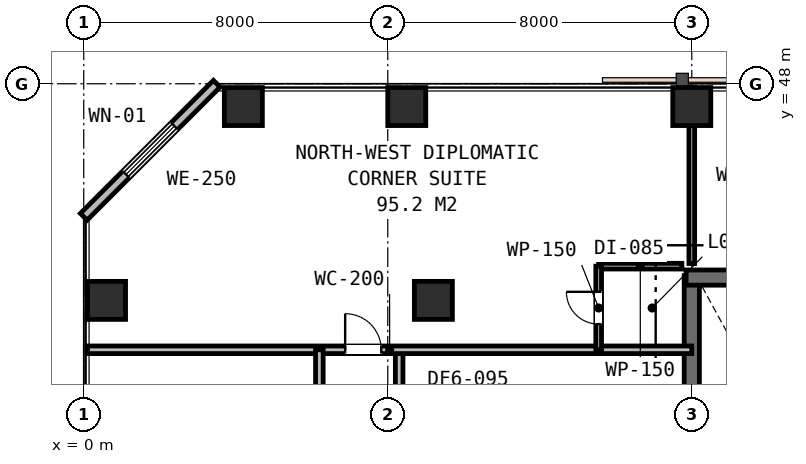
"""IFC4 building model, lengths in metres.
Left out: names, types, materials, properties, quantities, classifications, styles, units other than length and angle.
Written with IfcOpenShell. Run it as: python <this file> out.ifc"""

import sys

from ifc_helpers import new_model, si_unit, direction, frame, frame_2d, origin, origin_2d, place, context, subcontext, project, spatial, rectangle, extrude, element, fill, save


model = new_model("IFC4")
c1 = context("Model", 3, precision=1e-05, world=origin(), true_north=direction((0.0, 1.0)))
c2 = subcontext(c1, "Body", "Model", "MODEL_VIEW")
j1 = project(units=[si_unit("LENGTHUNIT", "METRE"), si_unit("PLANEANGLEUNIT", "RADIAN")], contexts=[c1])
p1 = place(None, origin())
s1 = spatial("IfcSite", under=j1, at=p1, CompositionType="ELEMENT")
p2 = place(p1, origin())
s2 = spatial("IfcBuilding", under=s1, at=p2, CompositionType="ELEMENT")
p3 = place(p2, frame((0.0, 0.0, 33.0)))
s3 = spatial("IfcBuildingStorey", under=s2, at=p3, CompositionType="ELEMENT", Elevation=33.0)
p4 = place(p3, frame((16.0, 30.65, 0.0), z_axis=(0.0, 0.0, 1.0), x_axis=(0.0, 1.0, 0.0)))
e1 = element("IfcWall", 1, at=p4, inside=s3, PredefinedType="SHEAR", context=c2, shape_type="SweptSolid", body=[
    extrude(rectangle(XDim=12.3, YDim=0.4, at=frame_2d((6.15, 0.0))), origin(), (0.0, 0.0, 1.0), 3.6),
])
p5 = place(p3, frame((15.85, 42.9, 0.0), z_axis=(0.0, 0.0, 1.0), x_axis=(1.0, 0.0, 0.0)))
e2 = element("IfcWall", 2, at=p5, inside=s3, PredefinedType="SHEAR", context=c2, shape_type="SweptSolid", body=[
    extrude(rectangle(XDim=24.3, YDim=0.4, at=frame_2d((12.15, 0.0))), origin(), (0.0, 0.0, 1.0), 3.6),
])
for number, where, z_axis, x_axis in (
    (3, (9.2, 42.3, 0.0), (0.0, 0.0, 1.0), (1.0, 0.0, 0.0)),
    (4, (0.6, 42.3, 0.0), (0.0, 0.0, 1.0), (1.0, 0.0, 0.0)),
    (5, (4.2, 47.4, 0.0), (0.0, 0.0, 1.0), (1.0, 0.0, 0.0)),
    (6, (8.5, 47.4, 0.0), (0.0, 0.0, 1.0), (1.0, 0.0, 0.0)),
    (7, (16.0, 47.4, 0.0), (0.0, 0.0, 1.0), (1.0, 0.0, 0.0)),
):
    element("IfcColumn", number, at=place(p3, frame(where, z_axis=z_axis, x_axis=x_axis)), inside=s3, PredefinedType="COLUMN", context=c2, shape_type="SweptSolid", body=[
        extrude(rectangle(XDim=1.0, YDim=1.0, at=origin_2d()), origin(), (0.0, 0.0, 1.0), 3.6),
    ])
p6 = place(p3, frame((3.5, 48.0, 0.0), z_axis=(0.0, 0.0, 1.0), x_axis=(-0.707106781187, -0.707106781187, 0.0)))
e8 = element("IfcWall", 8, at=p6, inside=s3, PredefinedType="STANDARD", context=c2, shape_type="SweptSolid", body=[
    extrude(rectangle(XDim=4.95, YDim=0.25, at=frame_2d((2.475, 0.0))), origin(), (0.0, 0.0, 1.0), 3.33),
])
p7 = place(p6, frame((1.575, 0.0, 0.75)))
e9 = element("IfcOpeningElement", 9, at=p7, cuts=e8, PredefinedType="OPENING", context=c2, shape_type="SweptSolid", body=[
    extrude(rectangle(XDim=1.8, YDim=1.85, at=frame_2d((0.9, 0.925))), frame((0.0, 0.135, 0.0), z_axis=(0.0, -1.0, 0.0), x_axis=(1.0, 0.0, 0.0)), (0.0, 0.0, 1.0), 0.27),
])
p8 = place(p3, frame((8.3, 30.8, 0.0), z_axis=(0.0, 0.0, 1.0), x_axis=(0.0, 1.0, 0.0)))
e10 = element("IfcWall", 10, at=p8, inside=s3, PredefinedType="PARTITIONING", context=c2, shape_type="SweptSolid", body=[
    extrude(rectangle(XDim=10.2, YDim=0.2, at=frame_2d((5.1, 0.0))), origin(), (0.0, 0.0, 1.0), 2.68),
])
p9 = place(p8, frame((1.95, 0.0, 0.0)))
e11 = element("IfcOpeningElement", 11, at=p9, cuts=e10, PredefinedType="OPENING", context=c2, shape_type="SweptSolid", body=[
    extrude(rectangle(XDim=0.9, YDim=2.15, at=frame_2d((0.45, 1.075))), frame((0.0, 0.11, 0.0), z_axis=(0.0, -1.0, 0.0), x_axis=(1.0, 0.0, 0.0)), (0.0, 0.0, 1.0), 0.22),
])
p10 = place(p8, frame((7.025, 0.0, 0.0)))
e12 = element("IfcOpeningElement", 12, at=p10, cuts=e10, PredefinedType="OPENING", context=c2, shape_type="SweptSolid", body=[
    extrude(rectangle(XDim=0.95, YDim=2.15, at=frame_2d((0.475, 1.075))), frame((0.0, 0.11, 0.0), z_axis=(0.0, -1.0, 0.0), x_axis=(1.0, 0.0, 0.0)), (0.0, 0.0, 1.0), 0.22),
])
p11 = place(p3, frame((0.1, 41.0, 0.0), z_axis=(0.0, 0.0, 1.0), x_axis=(1.0, 0.0, 0.0)))
e13 = element("IfcWall", 13, at=p11, inside=s3, PredefinedType="PARTITIONING", context=c2, shape_type="SweptSolid", body=[
    extrude(rectangle(XDim=15.9, YDim=0.2, at=frame_2d((7.95, 0.0))), origin(), (0.0, 0.0, 1.0), 2.68),
])
p12 = place(p11, frame((6.779, 0.0, 0.0)))
e14 = element("IfcOpeningElement", 14, at=p12, cuts=e13, PredefinedType="OPENING", context=c2, shape_type="SweptSolid", body=[
    extrude(rectangle(XDim=0.95, YDim=2.15, at=frame_2d((0.475, 1.075))), frame((0.0, 0.11, 0.0), z_axis=(0.0, -1.0, 0.0), x_axis=(1.0, 0.0, 0.0)), (0.0, 0.0, 1.0), 0.22),
])
p13 = place(p3, frame((13.55, 43.2, 0.0), z_axis=(0.0, 0.0, 1.0), x_axis=(1.0, 0.0, 0.0)))
e15 = element("IfcWall", 15, at=p13, inside=s3, PredefinedType="PARTITIONING", context=c2, shape_type="SweptSolid", body=[
    extrude(rectangle(XDim=2.19, YDim=0.15, at=frame_2d((1.095, 0.0))), origin(), (0.0, 0.0, 1.0), 3.33),
])
p14 = place(p3, frame((13.55, 41.0, 0.0), z_axis=(0.0, 0.0, 1.0), x_axis=(0.0, 1.0, 0.0)))
e16 = element("IfcWall", 16, at=p14, inside=s3, PredefinedType="PARTITIONING", context=c2, shape_type="SweptSolid", body=[
    extrude(rectangle(XDim=2.2, YDim=0.15, at=frame_2d((1.1, 0.0))), origin(), (0.0, 0.0, 1.0), 3.33),
])
p15 = place(p14, frame((0.675, 0.0, 0.0)))
e17 = element("IfcOpeningElement", 17, at=p15, cuts=e16, PredefinedType="OPENING", context=c2, shape_type="SweptSolid", body=[
    extrude(rectangle(XDim=0.85, YDim=2.15, at=frame_2d((0.425, 1.075))), frame((0.0, 0.085, 0.0), z_axis=(0.0, -1.0, 0.0), x_axis=(1.0, 0.0, 0.0)), (0.0, 0.0, 1.0), 0.17),
])
p16 = place(p3, frame((6.2, 28.6, 0.0), z_axis=(0.0, 0.0, 1.0), x_axis=(0.0, 1.0, 0.0)))
e18 = element("IfcWall", 18, at=p16, inside=s3, PredefinedType="PARTITIONING", context=c2, shape_type="SweptSolid", body=[
    extrude(rectangle(XDim=12.4, YDim=0.2, at=frame_2d((6.2, 0.0))), origin(), (0.0, 0.0, 1.0), 2.68),
])
p17 = place(p16, frame((3.725, 0.0, 0.0)))
e19 = element("IfcOpeningElement", 19, at=p17, cuts=e18, PredefinedType="OPENING", context=c2, shape_type="SweptSolid", body=[
    extrude(rectangle(XDim=0.95, YDim=2.15, at=frame_2d((0.475, 1.075))), frame((0.0, 0.11, 0.0), z_axis=(0.0, -1.0, 0.0), x_axis=(1.0, 0.0, 0.0)), (0.0, 0.0, 1.0), 0.22),
])
p18 = place(p16, frame((8.91, 0.0, 0.0)))
e20 = element("IfcOpeningElement", 20, at=p18, cuts=e18, PredefinedType="OPENING", context=c2, shape_type="SweptSolid", body=[
    extrude(rectangle(XDim=0.95, YDim=2.15, at=frame_2d((0.475, 1.075))), frame((0.0, 0.11, 0.0), z_axis=(0.0, -1.0, 0.0), x_axis=(1.0, 0.0, 0.0)), (0.0, 0.0, 1.0), 0.22),
])
p19 = place(p3, frame((16.0, 43.27, 0.0), z_axis=(0.0, 0.0, 1.0), x_axis=(0.0, 1.0, 0.0)))
e21 = element("IfcWall", 21, at=p19, inside=s3, PredefinedType="PARTITIONING", context=c2, shape_type="SweptSolid", body=[
    extrude(rectangle(XDim=4.63, YDim=0.15, at=frame_2d((2.315, 0.0))), origin(), (0.0, 0.0, 1.0), 2.87),
])
p20 = place(p7, origin())
e22 = element("IfcWindow", 22, at=p20, inside=s3, PartitioningType="SINGLE_PANEL", PredefinedType="WINDOW", context=c2, shape_type="SweptSolid", body=[
    extrude(rectangle(XDim=1.8, YDim=1.85, at=frame_2d((0.9, 0.925))), frame((0.0, 0.03, 0.0), z_axis=(0.0, -1.0, 0.0), x_axis=(1.0, 0.0, 0.0)), (0.0, 0.0, 1.0), 0.06),
])
fill(e9, e22)
p21 = place(p12, origin())
e23 = element("IfcDoor", 23, at=p21, inside=s3, OperationType="SINGLE_SWING_LEFT", PredefinedType="DOOR", context=c2, shape_type="SweptSolid", body=[
    extrude(rectangle(XDim=0.95, YDim=2.15, at=frame_2d((0.475, 1.075))), frame((0.0, 0.025, 0.0), z_axis=(0.0, -1.0, 0.0), x_axis=(1.0, 0.0, 0.0)), (0.0, 0.0, 1.0), 0.05),
])
fill(e14, e23)
p22 = place(p15, origin())
e24 = element("IfcDoor", 24, at=p22, inside=s3, OperationType="SINGLE_SWING_RIGHT", PredefinedType="DOOR", context=c2, shape_type="SweptSolid", body=[
    extrude(rectangle(XDim=0.85, YDim=2.15, at=frame_2d((0.425, 1.075))), frame((0.0, 0.025, 0.0), z_axis=(0.0, -1.0, 0.0), x_axis=(1.0, 0.0, 0.0)), (0.0, 0.0, 1.0), 0.05),
])
fill(e17, e24)
save(model, sys.argv[1])
